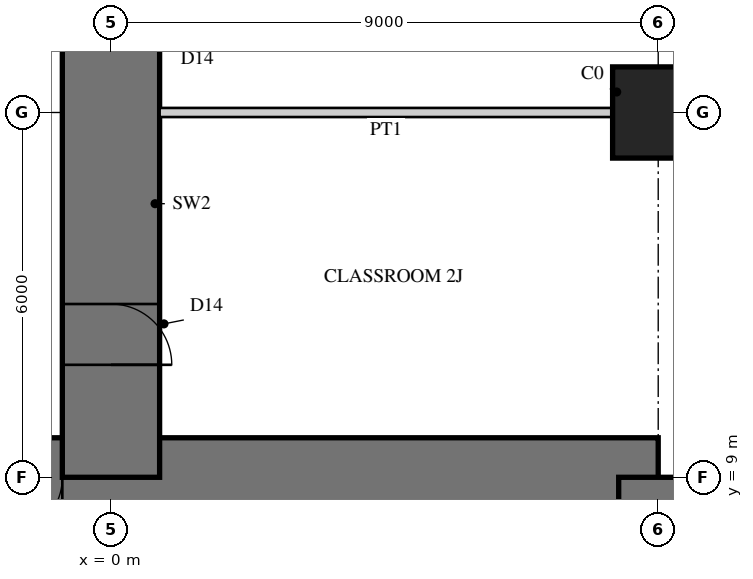
"""IFC4 building model, lengths in metres.
Left out: names, types, materials, properties, quantities, classifications, styles, units other than length and angle.
Written with IfcOpenShell. Run it as: python <this file> out.ifc"""

import sys

from ifc_helpers import new_model, si_unit, direction, frame, frame_2d, origin, origin_2d, place, context, subcontext, project, spatial, rectangle, extrude, element, fill, save


model = new_model("IFC4")
c1 = context("Model", 3, precision=1e-05, world=origin(), true_north=direction((0.0, 1.0)))
c2 = subcontext(c1, "Body", "Model", "MODEL_VIEW")
j1 = project(units=[si_unit("LENGTHUNIT", "METRE"), si_unit("PLANEANGLEUNIT", "RADIAN")], contexts=[c1])
p1 = place(None, origin())
s1 = spatial("IfcSite", under=j1, at=p1, CompositionType="ELEMENT")
p2 = place(p1, origin())
s2 = spatial("IfcBuilding", under=s1, at=p2, CompositionType="ELEMENT")
p3 = place(p2, frame((0.0, 0.0, 9.5)))
s3 = spatial("IfcBuildingStorey", under=s2, at=p3, CompositionType="ELEMENT", Elevation=9.5)
p4 = place(p3, frame((9.0, 9.0, 0.0), z_axis=(0.0, 0.0, 1.0), x_axis=(-1.0, 0.0, 0.0)))
e1 = element("IfcWall", 1, at=p4, inside=s3, PredefinedType="SHEAR", context=c2, shape_type="SweptSolid", body=[
    extrude(rectangle(XDim=18.0, YDim=1.3, at=frame_2d((9.0, 0.0))), origin(), (0.0, 0.0, 1.0), 4.5),
])
p5 = place(p4, frame((9.8, 0.0, 0.0)))
e2 = element("IfcOpeningElement", 2, at=p5, cuts=e1, PredefinedType="OPENING", context=c2, shape_type="SweptSolid", body=[
    extrude(rectangle(XDim=1.0, YDim=2.4, at=frame_2d((0.5, 1.2))), frame((0.0, 0.66, 0.0), z_axis=(0.0, -1.0, 0.0), x_axis=(1.0, 0.0, 0.0)), (0.0, 0.0, 1.0), 1.32),
])
p6 = place(p3, frame((9.0, -9.0, 0.0), z_axis=(0.0, 0.0, 1.0), x_axis=(0.0, 1.0, 0.0)))
e3 = element("IfcWall", 3, at=p6, inside=s3, PredefinedType="SHEAR", context=c2, shape_type="SweptSolid", body=[
    extrude(rectangle(XDim=18.0, YDim=1.3, at=frame_2d((9.0, 0.0))), origin(), (0.0, 0.0, 1.0), 4.5),
])
p7 = place(p6, frame((9.8, 0.0, 0.0)))
e4 = element("IfcOpeningElement", 4, at=p7, cuts=e3, PredefinedType="OPENING", context=c2, shape_type="SweptSolid", body=[
    extrude(rectangle(XDim=1.0, YDim=2.4, at=frame_2d((0.5, 1.2))), frame((0.0, 0.66, 0.0), z_axis=(0.0, -1.0, 0.0), x_axis=(1.0, 0.0, 0.0)), (0.0, 0.0, 1.0), 1.32),
])
p8 = place(p3, frame((0.0, 9.0, 0.0), z_axis=(0.0, 0.0, 1.0), x_axis=(0.0, 1.0, 0.0)))
e5 = element("IfcWall", 5, at=p8, inside=s3, PredefinedType="SHEAR", context=c2, shape_type="SweptSolid", body=[
    extrude(rectangle(XDim=9.0, YDim=1.6, at=frame_2d((4.5, 0.0))), origin(), (0.0, 0.0, 1.0), 4.5),
])
p9 = place(p8, frame((1.85, 0.0, 0.0)))
e6 = element("IfcOpeningElement", 6, at=p9, cuts=e5, PredefinedType="OPENING", context=c2, shape_type="SweptSolid", body=[
    extrude(rectangle(XDim=1.0, YDim=2.2, at=frame_2d((0.5, 1.1))), frame((0.0, 0.81, 0.0), z_axis=(0.0, -1.0, 0.0), x_axis=(1.0, 0.0, 0.0)), (0.0, 0.0, 1.0), 1.62),
])
p10 = place(p8, frame((7.2, 0.0, 0.0)))
e7 = element("IfcOpeningElement", 7, at=p10, cuts=e5, PredefinedType="OPENING", context=c2, shape_type="SweptSolid", body=[
    extrude(rectangle(XDim=1.0, YDim=2.2, at=frame_2d((0.5, 1.1))), frame((0.0, 0.81, 0.0), z_axis=(0.0, -1.0, 0.0), x_axis=(1.0, 0.0, 0.0)), (0.0, 0.0, 1.0), 1.62),
])
p11 = place(p3, frame((9.0, 15.0, 0.0), z_axis=(0.0, 0.0, 1.0), x_axis=(1.0, 0.0, 0.0)))
e8 = element("IfcColumn", 8, at=p11, inside=s3, PredefinedType="COLUMN", context=c2, shape_type="SweptSolid", body=[
    extrude(rectangle(XDim=1.5, YDim=1.5, at=origin_2d()), origin(), (0.0, 0.0, 1.0), 4.5),
])
p12 = place(p3, frame((8.25, 15.0, 0.0), z_axis=(0.0, 0.0, 1.0), x_axis=(-1.0, 0.0, 0.0)))
e9 = element("IfcWall", 9, at=p12, inside=s3, PredefinedType="PARTITIONING", context=c2, shape_type="SweptSolid", body=[
    extrude(rectangle(XDim=7.45, YDim=0.15, at=frame_2d((3.725, 0.0))), origin(), (0.0, 0.0, 1.0), 3.35),
])
p13 = place(p9, frame((1.0, 0.0, 0.0), z_axis=(0.0, 0.0, 1.0), x_axis=(-1.0, 0.0, 0.0)))
e10 = element("IfcDoor", 10, at=p13, inside=s3, OperationType="SINGLE_SWING_RIGHT", PredefinedType="DOOR", context=c2, shape_type="SweptSolid", body=[
    extrude(rectangle(XDim=1.0, YDim=2.2, at=frame_2d((0.5, 1.1))), frame((0.0, 0.025, 0.0), z_axis=(0.0, -1.0, 0.0), x_axis=(1.0, 0.0, 0.0)), (0.0, 0.0, 1.0), 0.05),
])
fill(e6, e10)
p14 = place(p5, origin())
e11 = element("IfcDoor", 11, at=p14, inside=s3, OperationType="SINGLE_SWING_RIGHT", PredefinedType="DOOR", context=c2, shape_type="SweptSolid", body=[
    extrude(rectangle(XDim=1.0, YDim=2.4, at=frame_2d((0.5, 1.2))), frame((0.0, 0.055, 0.0), z_axis=(0.0, -1.0, 0.0), x_axis=(1.0, 0.0, 0.0)), (0.0, 0.0, 1.0), 0.05),
])
fill(e2, e11)
save(model, sys.argv[1])
